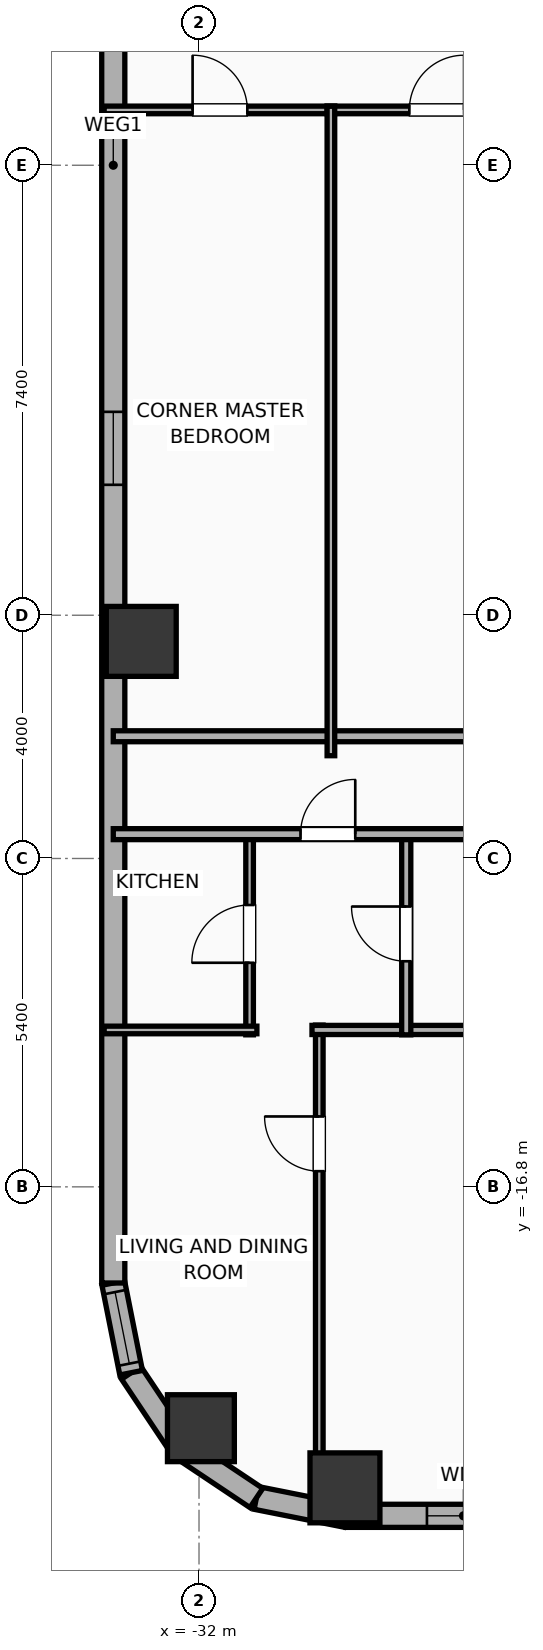
"""IFC4 building model, lengths in metres.
Left out: names, types, materials, properties, quantities, classifications, styles, units other than length and angle.
Written with IfcOpenShell. Run it as: python <this file> out.ifc"""

import sys

from ifc_helpers import new_model, si_unit, direction, frame, frame_2d, origin, origin_2d, place, context, subcontext, project, spatial, rectangle, hollow_rectangle, hollow_circle, extrude, element, fill, save


model = new_model("IFC4")
c1 = context("Model", 3, precision=1e-05, world=origin(), true_north=direction((0.0, 1.0)))
c2 = subcontext(c1, "Body", "Model", "MODEL_VIEW")
j1 = project(units=[si_unit("LENGTHUNIT", "METRE"), si_unit("PLANEANGLEUNIT", "RADIAN")], contexts=[c1])
p1 = place(None, origin())
s1 = spatial("IfcSite", under=j1, at=p1, CompositionType="ELEMENT")
p2 = place(p1, origin())
s2 = spatial("IfcBuilding", under=s1, at=p2, CompositionType="ELEMENT")
p3 = place(p2, frame((0.0, 0.0, 65.0)))
s3 = spatial("IfcBuildingStorey", under=s2, at=p3, CompositionType="ELEMENT", Elevation=65.0)
for number, where, z_axis, x_axis in (
    (1, (-29.6, -21.75, 0.0), (0.0, 0.0, 1.0), (1.0, 0.0, 0.0)),
    (2, (-32.95, -7.83, 0.0), (0.0, 0.0, 1.0), (1.0, 0.0, 0.0)),
):
    element("IfcColumn", number, at=place(p3, frame(where, z_axis=z_axis, x_axis=x_axis)), inside=s3, PredefinedType="COLUMN", context=c2, shape_type="SweptSolid", body=[
        extrude(hollow_rectangle(XDim=1.15, YDim=1.15, WallThickness=0.04, at=origin_2d()), origin(), (0.0, 0.0, 1.0), 3.9),
    ])
p4 = place(p3, frame((-31.969, -20.769, 0.0), z_axis=(0.0, 0.0, 1.0), x_axis=(1.0, 0.0, 0.0)))
e3 = element("IfcColumn", 3, at=p4, inside=s3, PredefinedType="COLUMN", context=c2, shape_type="SweptSolid", body=[
    extrude(hollow_circle(Radius=0.55, WallThickness=0.036, at=origin_2d()), origin(), (0.0, 0.0, 1.0), 3.9),
])
p5 = place(p3, frame((22.381, -22.21, 0.0), z_axis=(0.0, 0.0, 1.0), x_axis=(-1.0, 0.0, 0.0)))
e4 = element("IfcWall", 4, at=p5, inside=s3, PredefinedType="ELEMENTEDWALL", context=c2, shape_type="SweptSolid", body=[
    extrude(rectangle(XDim=51.963, YDim=0.38, at=frame_2d((25.981, 0.0))), origin(), (0.0, 0.0, 1.0), 3.65),
])
p6 = place(p5, frame((25.631, 0.0, 0.75)))
e5 = element("IfcOpeningElement", 5, at=p6, cuts=e4, PredefinedType="OPENING", context=c2, shape_type="SweptSolid", body=[
    extrude(rectangle(XDim=2.4, YDim=2.1, at=frame_2d((1.2, 1.05))), frame((0.0, 0.2, 0.0), z_axis=(0.0, -1.0, 0.0), x_axis=(1.0, 0.0, 0.0)), (0.0, 0.0, 1.0), 0.4),
])
p7 = place(p5, frame((42.952, 0.0, 0.75)))
e6 = element("IfcOpeningElement", 6, at=p7, cuts=e4, PredefinedType="OPENING", context=c2, shape_type="SweptSolid", body=[
    extrude(rectangle(XDim=2.4, YDim=2.1, at=frame_2d((1.2, 1.05))), frame((0.0, 0.2, 0.0), z_axis=(0.0, -1.0, 0.0), x_axis=(1.0, 0.0, 0.0)), (0.0, 0.0, 1.0), 0.4),
])
p8 = place(p5, frame((49.433, 0.0, 0.75)))
e7 = element("IfcOpeningElement", 7, at=p8, cuts=e4, PredefinedType="OPENING", context=c2, shape_type="SweptSolid", body=[
    extrude(rectangle(XDim=1.2, YDim=2.05, at=frame_2d((0.6, 1.025))), frame((0.0, 0.2, 0.0), z_axis=(0.0, -1.0, 0.0), x_axis=(1.0, 0.0, 0.0)), (0.0, 0.0, 1.0), 0.4),
])
p9 = place(p5, frame((46.695, 0.0, 0.75)))
e8 = element("IfcOpeningElement", 8, at=p9, cuts=e4, PredefinedType="OPENING", context=c2, shape_type="SweptSolid", body=[
    extrude(rectangle(XDim=1.2, YDim=2.05, at=frame_2d((0.6, 1.025))), frame((0.0, 0.2, 0.0), z_axis=(0.0, -1.0, 0.0), x_axis=(1.0, 0.0, 0.0)), (0.0, 0.0, 1.0), 0.4),
])
p10 = place(p5, frame((39.529, 0.0, 0.75)))
e9 = element("IfcOpeningElement", 9, at=p10, cuts=e4, PredefinedType="OPENING", context=c2, shape_type="SweptSolid", body=[
    extrude(rectangle(XDim=1.2, YDim=2.05, at=frame_2d((0.6, 1.025))), frame((0.0, 0.2, 0.0), z_axis=(0.0, -1.0, 0.0), x_axis=(1.0, 0.0, 0.0)), (0.0, 0.0, 1.0), 0.4),
])
p11 = place(p5, frame((36.486, 0.0, 0.75)))
e10 = element("IfcOpeningElement", 10, at=p11, cuts=e4, PredefinedType="OPENING", context=c2, shape_type="SweptSolid", body=[
    extrude(rectangle(XDim=1.2, YDim=2.05, at=frame_2d((0.6, 1.025))), frame((0.0, 0.2, 0.0), z_axis=(0.0, -1.0, 0.0), x_axis=(1.0, 0.0, 0.0)), (0.0, 0.0, 1.0), 0.4),
])
p12 = place(p5, frame((32.986, 0.0, 0.75)))
e11 = element("IfcOpeningElement", 11, at=p12, cuts=e4, PredefinedType="OPENING", context=c2, shape_type="SweptSolid", body=[
    extrude(rectangle(XDim=1.2, YDim=2.05, at=frame_2d((0.6, 1.025))), frame((0.0, 0.2, 0.0), z_axis=(0.0, -1.0, 0.0), x_axis=(1.0, 0.0, 0.0)), (0.0, 0.0, 1.0), 0.4),
])
p13 = place(p5, frame((29.126, 0.0, 0.75)))
e12 = element("IfcOpeningElement", 12, at=p13, cuts=e4, PredefinedType="OPENING", context=c2, shape_type="SweptSolid", body=[
    extrude(rectangle(XDim=1.2, YDim=2.05, at=frame_2d((0.6, 1.025))), frame((0.0, 0.2, 0.0), z_axis=(0.0, -1.0, 0.0), x_axis=(1.0, 0.0, 0.0)), (0.0, 0.0, 1.0), 0.4),
])
p14 = place(p5, frame((22.486, 0.0, 0.75)))
e13 = element("IfcOpeningElement", 13, at=p14, cuts=e4, PredefinedType="OPENING", context=c2, shape_type="SweptSolid", body=[
    extrude(rectangle(XDim=1.2, YDim=2.05, at=frame_2d((0.6, 1.025))), frame((0.0, 0.2, 0.0), z_axis=(0.0, -1.0, 0.0), x_axis=(1.0, 0.0, 0.0)), (0.0, 0.0, 1.0), 0.4),
])
p15 = place(p5, frame((18.746, 0.0, 0.75)))
e14 = element("IfcOpeningElement", 14, at=p15, cuts=e4, PredefinedType="OPENING", context=c2, shape_type="SweptSolid", body=[
    extrude(rectangle(XDim=1.2, YDim=2.05, at=frame_2d((0.6, 1.025))), frame((0.0, 0.2, 0.0), z_axis=(0.0, -1.0, 0.0), x_axis=(1.0, 0.0, 0.0)), (0.0, 0.0, 1.0), 0.4),
])
p16 = place(p5, frame((15.486, 0.0, 0.75)))
e15 = element("IfcOpeningElement", 15, at=p16, cuts=e4, PredefinedType="OPENING", context=c2, shape_type="SweptSolid", body=[
    extrude(rectangle(XDim=1.2, YDim=2.05, at=frame_2d((0.6, 1.025))), frame((0.0, 0.2, 0.0), z_axis=(0.0, -1.0, 0.0), x_axis=(1.0, 0.0, 0.0)), (0.0, 0.0, 1.0), 0.4),
])
p17 = place(p5, frame((11.986, 0.0, 0.75)))
e16 = element("IfcOpeningElement", 16, at=p17, cuts=e4, PredefinedType="OPENING", context=c2, shape_type="SweptSolid", body=[
    extrude(rectangle(XDim=1.2, YDim=2.05, at=frame_2d((0.6, 1.025))), frame((0.0, 0.2, 0.0), z_axis=(0.0, -1.0, 0.0), x_axis=(1.0, 0.0, 0.0)), (0.0, 0.0, 1.0), 0.4),
])
p18 = place(p5, frame((8.366, 0.0, 0.75)))
e17 = element("IfcOpeningElement", 17, at=p18, cuts=e4, PredefinedType="OPENING", context=c2, shape_type="SweptSolid", body=[
    extrude(rectangle(XDim=1.2, YDim=2.05, at=frame_2d((0.6, 1.025))), frame((0.0, 0.2, 0.0), z_axis=(0.0, -1.0, 0.0), x_axis=(1.0, 0.0, 0.0)), (0.0, 0.0, 1.0), 0.4),
])
p19 = place(p5, frame((5.082, 0.0, 0.75)))
e18 = element("IfcOpeningElement", 18, at=p19, cuts=e4, PredefinedType="OPENING", context=c2, shape_type="SweptSolid", body=[
    extrude(rectangle(XDim=1.2, YDim=2.05, at=frame_2d((0.6, 1.025))), frame((0.0, 0.2, 0.0), z_axis=(0.0, -1.0, 0.0), x_axis=(1.0, 0.0, 0.0)), (0.0, 0.0, 1.0), 0.4),
])
p20 = place(p5, frame((2.277, 0.0, 0.75)))
e19 = element("IfcOpeningElement", 19, at=p20, cuts=e4, PredefinedType="OPENING", context=c2, shape_type="SweptSolid", body=[
    extrude(rectangle(XDim=1.2, YDim=2.05, at=frame_2d((0.6, 1.025))), frame((0.0, 0.2, 0.0), z_axis=(0.0, -1.0, 0.0), x_axis=(1.0, 0.0, 0.0)), (0.0, 0.0, 1.0), 0.4),
])
p21 = place(p5, frame((1.071, 0.0, 0.75)))
e20 = element("IfcOpeningElement", 20, at=p21, cuts=e4, PredefinedType="OPENING", context=c2, shape_type="SweptSolid", body=[
    extrude(rectangle(XDim=0.52, YDim=2.05, at=frame_2d((0.26, 1.025))), frame((0.0, 0.2, 0.0), z_axis=(0.0, -1.0, 0.0), x_axis=(1.0, 0.0, 0.0)), (0.0, 0.0, 1.0), 0.4),
])
p22 = place(p3, frame((-29.581, -22.21, 0.0), z_axis=(0.0, 0.0, 1.0), x_axis=(-0.980786132421, 0.195086038585, 0.0)))
e21 = element("IfcWall", 21, at=p22, inside=s3, PredefinedType="ELEMENTEDWALL", context=c2, shape_type="SweptSolid", body=[
    extrude(rectangle(XDim=1.504, YDim=0.38, at=frame_2d((0.752, 0.0))), origin(), (0.0, 0.0, 1.0), 3.65),
])
p23 = place(p3, frame((-31.057, -21.917, 0.0), z_axis=(0.0, 0.0, 1.0), x_axis=(-0.831442848281, 0.555610286119, 0.0)))
e22 = element("IfcWall", 22, at=p23, inside=s3, PredefinedType="ELEMENTEDWALL", context=c2, shape_type="SweptSolid", body=[
    extrude(rectangle(XDim=1.485, YDim=0.38, at=frame_2d((0.743, 0.0))), origin(), (0.0, 0.0, 1.0), 3.65),
])
p24 = place(p3, frame((-32.292, -21.091, 0.0), z_axis=(0.0, 0.0, 1.0), x_axis=(-0.555572577804, 0.831468045563, 0.0)))
e23 = element("IfcWall", 23, at=p24, inside=s3, PredefinedType="ELEMENTEDWALL", context=c2, shape_type="SweptSolid", body=[
    extrude(rectangle(XDim=1.485, YDim=0.38, at=frame_2d((0.742, 0.0))), origin(), (0.0, 0.0, 1.0), 3.65),
])
p25 = place(p3, frame((-33.116, -19.857, 0.0), z_axis=(0.0, 0.0, 1.0), x_axis=(-0.195086038585, 0.980786132421, 0.0)))
e24 = element("IfcWall", 24, at=p25, inside=s3, PredefinedType="ELEMENTEDWALL", context=c2, shape_type="SweptSolid", body=[
    extrude(rectangle(XDim=1.504, YDim=0.38, at=frame_2d((0.752, 0.0))), origin(), (0.0, 0.0, 1.0), 3.65),
])
p26 = place(p25, frame((0.152, 0.0, 0.75)))
e25 = element("IfcOpeningElement", 25, at=p26, cuts=e24, PredefinedType="OPENING", context=c2, shape_type="SweptSolid", body=[
    extrude(rectangle(XDim=1.2, YDim=2.05, at=frame_2d((0.6, 1.025))), frame((0.0, 0.2, 0.0), z_axis=(0.0, -1.0, 0.0), x_axis=(1.0, 0.0, 0.0)), (0.0, 0.0, 1.0), 0.4),
])
p27 = place(p3, frame((-33.41, -18.381, 0.0), z_axis=(0.0, 0.0, 1.0), x_axis=(0.0, 1.0, 0.0)))
e26 = element("IfcWall", 26, at=p27, inside=s3, PredefinedType="ELEMENTEDWALL", context=c2, shape_type="SweptSolid", body=[
    extrude(rectangle(XDim=36.763, YDim=0.38, at=frame_2d((18.381, 0.0))), origin(), (0.0, 0.0, 1.0), 3.65),
])
p28 = place(p27, frame((33.637, 0.0, 0.75)))
e27 = element("IfcOpeningElement", 27, at=p28, cuts=e26, PredefinedType="OPENING", context=c2, shape_type="SweptSolid", body=[
    extrude(rectangle(XDim=1.2, YDim=2.05, at=frame_2d((0.6, 1.025))), frame((0.0, 0.2, 0.0), z_axis=(0.0, -1.0, 0.0), x_axis=(1.0, 0.0, 0.0)), (0.0, 0.0, 1.0), 0.4),
])
p29 = place(p27, frame((22.576, 0.0, 0.75)))
e28 = element("IfcOpeningElement", 28, at=p29, cuts=e26, PredefinedType="OPENING", context=c2, shape_type="SweptSolid", body=[
    extrude(rectangle(XDim=1.2, YDim=2.05, at=frame_2d((0.6, 1.025))), frame((0.0, 0.2, 0.0), z_axis=(0.0, -1.0, 0.0), x_axis=(1.0, 0.0, 0.0)), (0.0, 0.0, 1.0), 0.4),
])
p30 = place(p27, frame((13.126, 0.0, 0.75)))
e29 = element("IfcOpeningElement", 29, at=p30, cuts=e26, PredefinedType="OPENING", context=c2, shape_type="SweptSolid", body=[
    extrude(rectangle(XDim=1.2, YDim=2.05, at=frame_2d((0.6, 1.025))), frame((0.0, 0.2, 0.0), z_axis=(0.0, -1.0, 0.0), x_axis=(1.0, 0.0, 0.0)), (0.0, 0.0, 1.0), 0.4),
])
p31 = place(p3, frame((-33.41, -9.39, 0.0), z_axis=(0.0, 0.0, 1.0), x_axis=(1.0, 0.0, 0.0)))
e30 = element("IfcWall", 30, at=p31, inside=s3, PredefinedType="PARTITIONING", context=c2, shape_type="SweptSolid", body=[
    extrude(rectangle(XDim=23.53, YDim=0.18, at=frame_2d((11.765, 0.0))), origin(), (0.0, 0.0, 1.0), 3.65),
])
p32 = place(p3, frame((-30.022, -22.275, 0.0), z_axis=(0.0, 0.0, 1.0), x_axis=(0.0, 1.0, 0.0)))
e31 = element("IfcWall", 31, at=p32, inside=s3, PredefinedType="PARTITIONING", context=c2, shape_type="SweptSolid", body=[
    extrude(rectangle(XDim=8.135, YDim=0.125, at=frame_2d((4.068, 0.0))), origin(), (0.0, 0.0, 1.0), 2.94),
])
p33 = place(p32, frame((5.733, 0.0, 0.0)))
e32 = element("IfcOpeningElement", 32, at=p33, cuts=e31, PredefinedType="OPENING", context=c2, shape_type="SweptSolid", body=[
    extrude(rectangle(XDim=0.9, YDim=2.05, at=frame_2d((0.45, 1.025))), frame((0.0, 0.073, 0.0), z_axis=(0.0, -1.0, 0.0), x_axis=(1.0, 0.0, 0.0)), (0.0, 0.0, 1.0), 0.145),
])
p34 = place(p3, frame((-30.142, -14.22, 0.0), z_axis=(0.0, 0.0, 1.0), x_axis=(1.0, 0.0, 0.0)))
e33 = element("IfcWall", 33, at=p34, inside=s3, PredefinedType="PLUMBINGWALL", context=c2, shape_type="SweptSolid", body=[
    extrude(rectangle(XDim=3.605, YDim=0.15, at=frame_2d((1.802, 0.0))), origin(), (0.0, 0.0, 1.0), 3.65),
])
p35 = place(p3, frame((-31.168, -14.3, 0.0), z_axis=(0.0, 0.0, 1.0), x_axis=(0.0, 1.0, 0.0)))
e34 = element("IfcWall", 34, at=p35, inside=s3, PredefinedType="PARTITIONING", context=c2, shape_type="SweptSolid", body=[
    extrude(rectangle(XDim=3.32, YDim=0.125, at=frame_2d((1.66, 0.0))), origin(), (0.0, 0.0, 1.0), 2.94),
])
p36 = place(p35, frame((1.185, 0.0, 0.0)))
e35 = element("IfcOpeningElement", 35, at=p36, cuts=e34, PredefinedType="OPENING", context=c2, shape_type="SweptSolid", body=[
    extrude(rectangle(XDim=0.95, YDim=2.05, at=frame_2d((0.475, 1.025))), frame((0.0, 0.073, 0.0), z_axis=(0.0, -1.0, 0.0), x_axis=(1.0, 0.0, 0.0)), (0.0, 0.0, 1.0), 0.145),
])
p37 = place(p3, frame((-33.56, -14.22, 0.0), z_axis=(0.0, 0.0, 1.0), x_axis=(1.0, 0.0, 0.0)))
e36 = element("IfcWall", 36, at=p37, inside=s3, PredefinedType="PARTITIONING", context=c2, shape_type="SweptSolid", body=[
    extrude(rectangle(XDim=2.512, YDim=0.125, at=frame_2d((1.256, 0.0))), origin(), (0.0, 0.0, 1.0), 3.65),
])
p38 = place(p3, frame((-28.592, -14.3, 0.0), z_axis=(0.0, 0.0, 1.0), x_axis=(0.0, 1.0, 0.0)))
e37 = element("IfcWall", 37, at=p38, inside=s3, PredefinedType="PLUMBINGWALL", context=c2, shape_type="SweptSolid", body=[
    extrude(rectangle(XDim=3.32, YDim=0.15, at=frame_2d((1.66, 0.0))), origin(), (0.0, 0.0, 1.0), 3.65),
])
p39 = place(p38, frame((1.21, 0.0, 0.0)))
e38 = element("IfcOpeningElement", 38, at=p39, cuts=e37, PredefinedType="OPENING", context=c2, shape_type="SweptSolid", body=[
    extrude(rectangle(XDim=0.9, YDim=2.05, at=frame_2d((0.45, 1.025))), frame((0.0, 0.085, 0.0), z_axis=(0.0, -1.0, 0.0), x_axis=(1.0, 0.0, 0.0)), (0.0, 0.0, 1.0), 0.17),
])
p40 = place(p3, frame((-33.41, -11.0, 0.0), z_axis=(0.0, 0.0, 1.0), x_axis=(1.0, 0.0, 0.0)))
e39 = element("IfcWall", 39, at=p40, inside=s3, PredefinedType="PARTITIONING", context=c2, shape_type="SweptSolid", body=[
    extrude(rectangle(XDim=59.62, YDim=0.18, at=frame_2d((29.81, 0.0))), origin(), (0.0, 0.0, 1.0), 3.65),
])
p41 = place(p40, frame((3.08, 0.0, 0.0)))
e40 = element("IfcOpeningElement", 40, at=p41, cuts=e39, PredefinedType="OPENING", context=c2, shape_type="SweptSolid", body=[
    extrude(rectangle(XDim=0.9, YDim=2.05, at=frame_2d((0.45, 1.025))), frame((0.0, 0.1, 0.0), z_axis=(0.0, -1.0, 0.0), x_axis=(1.0, 0.0, 0.0)), (0.0, 0.0, 1.0), 0.2),
])
p42 = place(p40, frame((9.918, 0.0, 0.0)))
e41 = element("IfcOpeningElement", 41, at=p42, cuts=e39, PredefinedType="OPENING", context=c2, shape_type="SweptSolid", body=[
    extrude(rectangle(XDim=0.9, YDim=2.05, at=frame_2d((0.45, 1.025))), frame((0.0, 0.1, 0.0), z_axis=(0.0, -1.0, 0.0), x_axis=(1.0, 0.0, 0.0)), (0.0, 0.0, 1.0), 0.2),
])
p43 = place(p40, frame((16.721, 0.0, 0.0)))
e42 = element("IfcOpeningElement", 42, at=p43, cuts=e39, PredefinedType="OPENING", context=c2, shape_type="SweptSolid", body=[
    extrude(rectangle(XDim=0.9, YDim=2.05, at=frame_2d((0.45, 1.025))), frame((0.0, 0.1, 0.0), z_axis=(0.0, -1.0, 0.0), x_axis=(1.0, 0.0, 0.0)), (0.0, 0.0, 1.0), 0.2),
])
p44 = place(p40, frame((23.625, 0.0, 0.0)))
e43 = element("IfcOpeningElement", 43, at=p44, cuts=e39, PredefinedType="OPENING", context=c2, shape_type="SweptSolid", body=[
    extrude(rectangle(XDim=0.9, YDim=2.05, at=frame_2d((0.45, 1.025))), frame((0.0, 0.1, 0.0), z_axis=(0.0, -1.0, 0.0), x_axis=(1.0, 0.0, 0.0)), (0.0, 0.0, 1.0), 0.2),
])
p45 = place(p40, frame((30.624, 0.0, 0.0)))
e44 = element("IfcOpeningElement", 44, at=p45, cuts=e39, PredefinedType="OPENING", context=c2, shape_type="SweptSolid", body=[
    extrude(rectangle(XDim=0.9, YDim=2.05, at=frame_2d((0.45, 1.025))), frame((0.0, 0.1, 0.0), z_axis=(0.0, -1.0, 0.0), x_axis=(1.0, 0.0, 0.0)), (0.0, 0.0, 1.0), 0.2),
])
p46 = place(p40, frame((37.623, 0.0, 0.0)))
e45 = element("IfcOpeningElement", 45, at=p46, cuts=e39, PredefinedType="OPENING", context=c2, shape_type="SweptSolid", body=[
    extrude(rectangle(XDim=0.9, YDim=2.05, at=frame_2d((0.45, 1.025))), frame((0.0, 0.1, 0.0), z_axis=(0.0, -1.0, 0.0), x_axis=(1.0, 0.0, 0.0)), (0.0, 0.0, 1.0), 0.2),
])
p47 = place(p40, frame((44.623, 0.0, 0.0)))
e46 = element("IfcOpeningElement", 46, at=p47, cuts=e39, PredefinedType="OPENING", context=c2, shape_type="SweptSolid", body=[
    extrude(rectangle(XDim=0.9, YDim=2.05, at=frame_2d((0.45, 1.025))), frame((0.0, 0.1, 0.0), z_axis=(0.0, -1.0, 0.0), x_axis=(1.0, 0.0, 0.0)), (0.0, 0.0, 1.0), 0.2),
])
p48 = place(p40, frame((49.565, 0.0, 0.0)))
e47 = element("IfcOpeningElement", 47, at=p48, cuts=e39, PredefinedType="OPENING", context=c2, shape_type="SweptSolid", body=[
    extrude(rectangle(XDim=1.15, YDim=2.05, at=frame_2d((0.575, 1.025))), frame((0.0, 0.1, 0.0), z_axis=(0.0, -1.0, 0.0), x_axis=(1.0, 0.0, 0.0)), (0.0, 0.0, 1.0), 0.2),
])
p49 = place(p40, frame((56.583, 0.0, 0.0)))
e48 = element("IfcOpeningElement", 48, at=p49, cuts=e39, PredefinedType="OPENING", context=c2, shape_type="SweptSolid", body=[
    extrude(rectangle(XDim=0.9, YDim=2.05, at=frame_2d((0.45, 1.025))), frame((0.0, 0.1, 0.0), z_axis=(0.0, -1.0, 0.0), x_axis=(1.0, 0.0, 0.0)), (0.0, 0.0, 1.0), 0.2),
])
p50 = place(p3, frame((-33.56, 0.91, 0.0), z_axis=(0.0, 0.0, 1.0), x_axis=(1.0, 0.0, 0.0)))
e49 = element("IfcWall", 49, at=p50, inside=s3, PredefinedType="PARTITIONING", context=c2, shape_type="SweptSolid", body=[
    extrude(rectangle(XDim=3.792, YDim=0.125, at=frame_2d((1.896, 0.0))), origin(), (0.0, 0.0, 1.0), 3.65),
])
p51 = place(p50, frame((1.455, 0.0, 0.0)))
e50 = element("IfcOpeningElement", 50, at=p51, cuts=e49, PredefinedType="OPENING", context=c2, shape_type="SweptSolid", body=[
    extrude(rectangle(XDim=0.9, YDim=2.05, at=frame_2d((0.45, 1.025))), frame((0.0, 0.073, 0.0), z_axis=(0.0, -1.0, 0.0), x_axis=(1.0, 0.0, 0.0)), (0.0, 0.0, 1.0), 0.145),
])
p52 = place(p3, frame((-29.894, 0.91, 0.0), z_axis=(0.0, 0.0, 1.0), x_axis=(1.0, 0.0, 0.0)))
e51 = element("IfcWall", 51, at=p52, inside=s3, PredefinedType="PARTITIONING", context=c2, shape_type="SweptSolid", body=[
    extrude(rectangle(XDim=3.605, YDim=0.125, at=frame_2d((1.802, 0.0))), origin(), (0.0, 0.0, 1.0), 3.65),
])
p53 = place(p52, frame((1.353, 0.0, 0.0)))
e52 = element("IfcOpeningElement", 52, at=p53, cuts=e51, PredefinedType="OPENING", context=c2, shape_type="SweptSolid", body=[
    extrude(rectangle(XDim=0.9, YDim=2.05, at=frame_2d((0.45, 1.025))), frame((0.0, 0.073, 0.0), z_axis=(0.0, -1.0, 0.0), x_axis=(1.0, 0.0, 0.0)), (0.0, 0.0, 1.0), 0.145),
])
p54 = place(p3, frame((-29.831, -9.71, 0.0), z_axis=(0.0, 0.0, 1.0), x_axis=(0.0, 1.0, 0.0)))
e53 = element("IfcWall", 53, at=p54, inside=s3, PredefinedType="PARTITIONING", context=c2, shape_type="SweptSolid", body=[
    extrude(rectangle(XDim=10.68, YDim=0.125, at=frame_2d((5.34, 0.0))), origin(), (0.0, 0.0, 1.0), 3.65),
])
p55 = place(p26, origin())
e54 = element("IfcWindow", 54, at=p55, inside=s3, PartitioningType="SINGLE_PANEL", PredefinedType="WINDOW", context=c2, shape_type="SweptSolid", body=[
    extrude(rectangle(XDim=1.2, YDim=2.05, at=frame_2d((0.6, 1.025))), frame((0.0, 0.03, 0.0), z_axis=(0.0, -1.0, 0.0), x_axis=(1.0, 0.0, 0.0)), (0.0, 0.0, 1.0), 0.06),
])
fill(e25, e54)
p56 = place(p8, origin())
e55 = element("IfcWindow", 55, at=p56, inside=s3, PartitioningType="SINGLE_PANEL", PredefinedType="WINDOW", context=c2, shape_type="SweptSolid", body=[
    extrude(rectangle(XDim=1.2, YDim=2.05, at=frame_2d((0.6, 1.025))), frame((0.0, 0.03, 0.0), z_axis=(0.0, -1.0, 0.0), x_axis=(1.0, 0.0, 0.0)), (0.0, 0.0, 1.0), 0.06),
])
fill(e7, e55)
p57 = place(p30, origin())
e56 = element("IfcWindow", 56, at=p57, inside=s3, PartitioningType="SINGLE_PANEL", PredefinedType="WINDOW", context=c2, shape_type="SweptSolid", body=[
    extrude(rectangle(XDim=1.2, YDim=2.05, at=frame_2d((0.6, 1.025))), frame((0.0, 0.03, 0.0), z_axis=(0.0, -1.0, 0.0), x_axis=(1.0, 0.0, 0.0)), (0.0, 0.0, 1.0), 0.06),
])
fill(e29, e56)
p58 = place(p33, origin())
e57 = element("IfcDoor", 57, at=p58, inside=s3, OperationType="SINGLE_SWING_RIGHT", PredefinedType="DOOR", context=c2, shape_type="SweptSolid", body=[
    extrude(rectangle(XDim=0.9, YDim=2.05, at=frame_2d((0.45, 1.025))), frame((0.0, 0.025, 0.0), z_axis=(0.0, -1.0, 0.0), x_axis=(1.0, 0.0, 0.0)), (0.0, 0.0, 1.0), 0.05),
])
fill(e32, e57)
p59 = place(p36, origin())
e58 = element("IfcDoor", 58, at=p59, inside=s3, OperationType="SINGLE_SWING_LEFT", PredefinedType="DOOR", context=c2, shape_type="SweptSolid", body=[
    extrude(rectangle(XDim=0.95, YDim=2.05, at=frame_2d((0.475, 1.025))), frame((0.0, 0.025, 0.0), z_axis=(0.0, -1.0, 0.0), x_axis=(1.0, 0.0, 0.0)), (0.0, 0.0, 1.0), 0.05),
])
fill(e35, e58)
p60 = place(p39, origin())
e59 = element("IfcDoor", 59, at=p60, inside=s3, OperationType="SINGLE_SWING_RIGHT", PredefinedType="DOOR", context=c2, shape_type="SweptSolid", body=[
    extrude(rectangle(XDim=0.9, YDim=2.05, at=frame_2d((0.45, 1.025))), frame((0.0, 0.025, 0.0), z_axis=(0.0, -1.0, 0.0), x_axis=(1.0, 0.0, 0.0)), (0.0, 0.0, 1.0), 0.05),
])
fill(e38, e59)
p61 = place(p41, origin())
e60 = element("IfcDoor", 60, at=p61, inside=s3, OperationType="SINGLE_SWING_RIGHT", PredefinedType="DOOR", context=c2, shape_type="SweptSolid", body=[
    extrude(rectangle(XDim=0.9, YDim=2.05, at=frame_2d((0.45, 1.025))), frame((0.0, 0.025, 0.0), z_axis=(0.0, -1.0, 0.0), x_axis=(1.0, 0.0, 0.0)), (0.0, 0.0, 1.0), 0.05),
])
fill(e40, e60)
p62 = place(p51, origin())
e61 = element("IfcDoor", 61, at=p62, inside=s3, OperationType="SINGLE_SWING_LEFT", PredefinedType="DOOR", context=c2, shape_type="SweptSolid", body=[
    extrude(rectangle(XDim=0.9, YDim=2.05, at=frame_2d((0.45, 1.025))), frame((0.0, 0.025, 0.0), z_axis=(0.0, -1.0, 0.0), x_axis=(1.0, 0.0, 0.0)), (0.0, 0.0, 1.0), 0.05),
])
fill(e50, e61)
p63 = place(p53, origin())
e62 = element("IfcDoor", 62, at=p63, inside=s3, OperationType="SINGLE_SWING_RIGHT", PredefinedType="DOOR", context=c2, shape_type="SweptSolid", body=[
    extrude(rectangle(XDim=0.9, YDim=2.05, at=frame_2d((0.45, 1.025))), frame((0.0, 0.025, 0.0), z_axis=(0.0, -1.0, 0.0), x_axis=(1.0, 0.0, 0.0)), (0.0, 0.0, 1.0), 0.05),
])
fill(e52, e62)
save(model, sys.argv[1])
